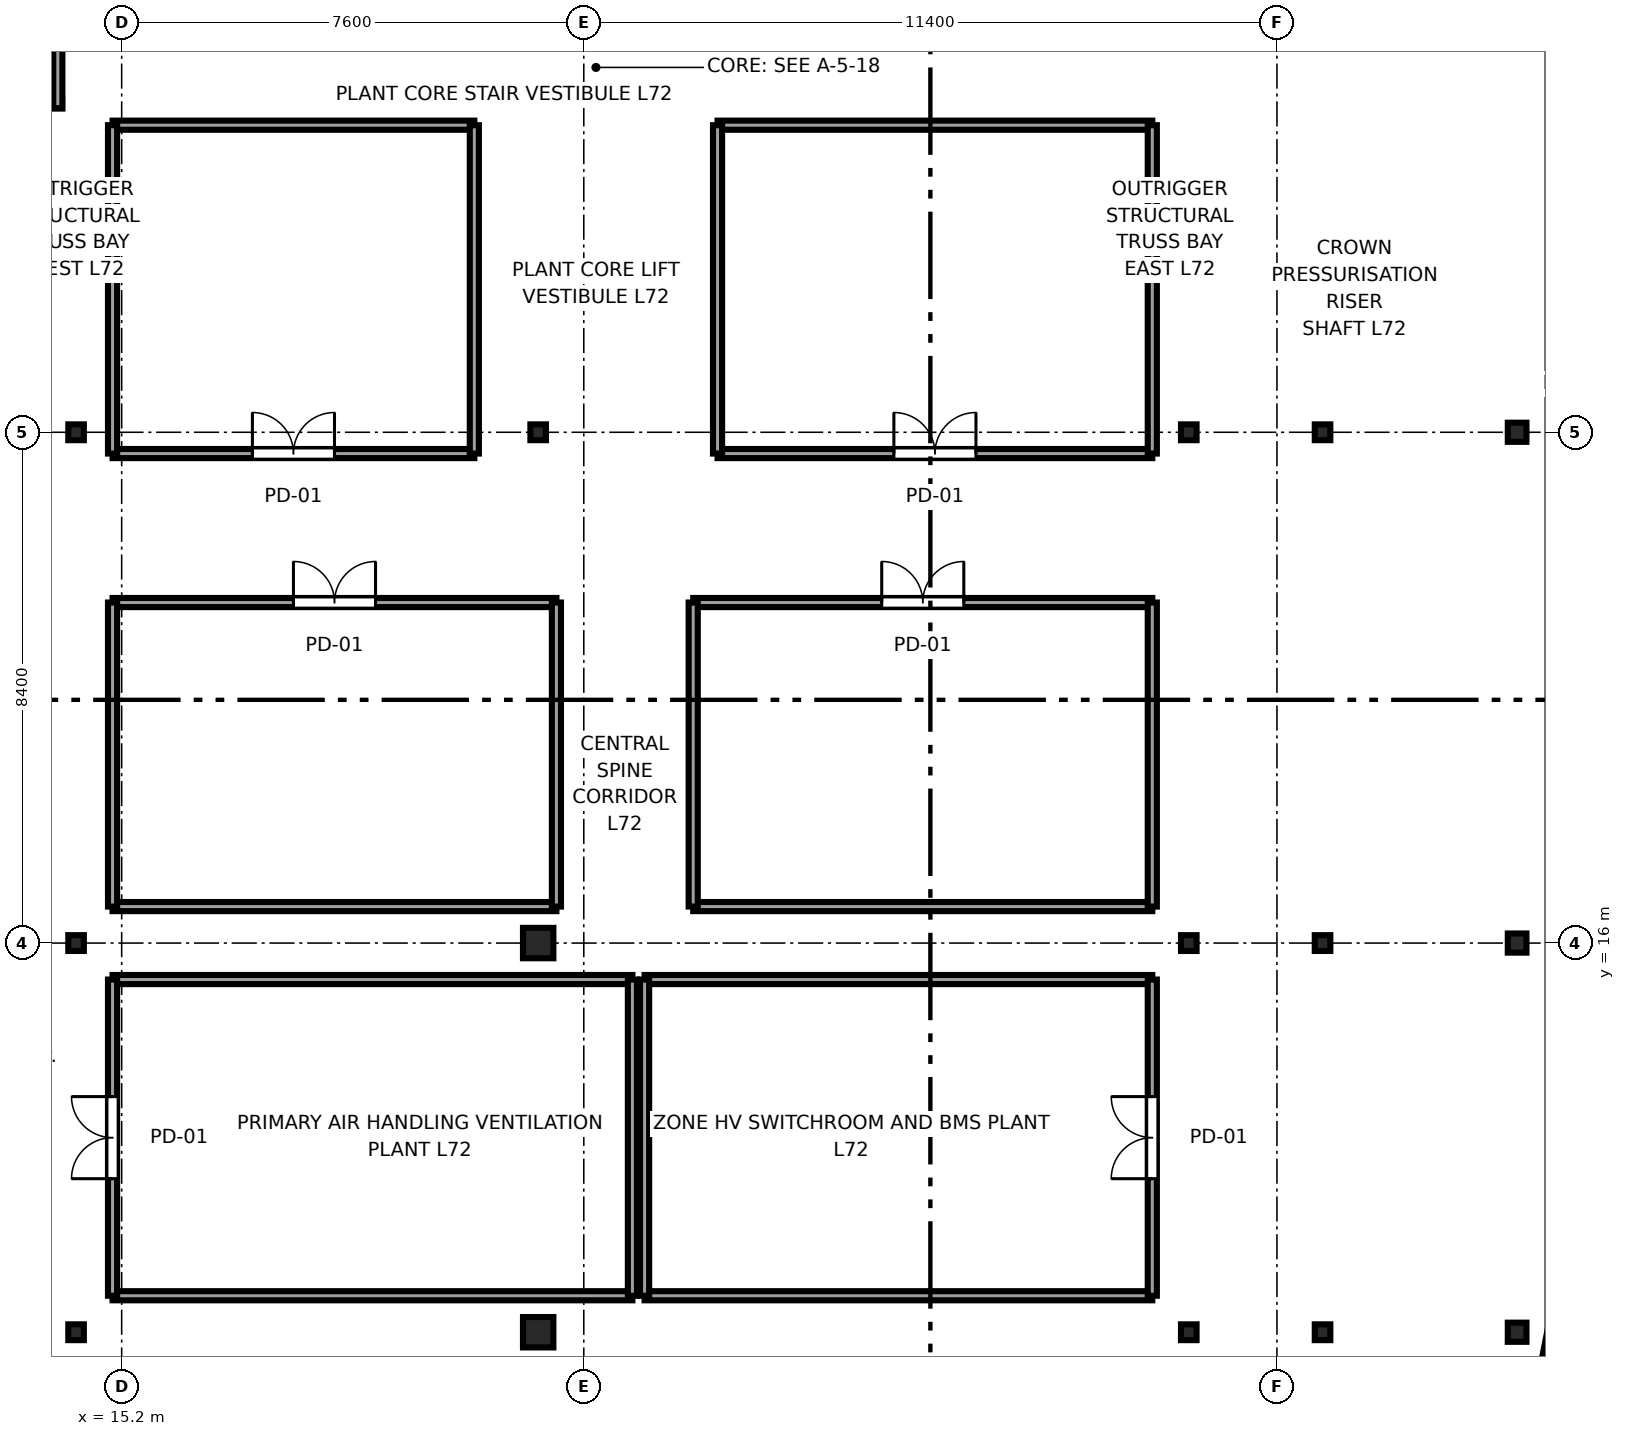
"""IFC4 building model, lengths in metres.
Left out: names, types, materials, properties, quantities, classifications, styles, units other than length and angle.
Written with IfcOpenShell. Run it as: python <this file> out.ifc"""

import sys

from ifc_helpers import new_model, si_unit, direction, frame, frame_2d, origin, origin_2d, place, context, subcontext, project, spatial, rectangle, i_section, extrude, source, transform, mapped, element, fill, save


model = new_model("IFC4")
c1 = context("Model", 3, precision=1e-05, world=origin(), true_north=direction((0.0, 1.0)))
c2 = subcontext(c1, "Body", "Model", "MODEL_VIEW")
j1 = project(units=[si_unit("LENGTHUNIT", "METRE"), si_unit("PLANEANGLEUNIT", "RADIAN")], contexts=[c1])
p1 = place(None, origin())
s1 = spatial("IfcSite", under=j1, at=p1, CompositionType="ELEMENT")
p2 = place(p1, origin())
s2 = spatial("IfcBuilding", under=s1, at=p2, CompositionType="ELEMENT")
p3 = place(p2, frame((0.0, 0.0, 270.05)))
s3 = spatial("IfcBuildingStorey", under=s2, at=p3, CompositionType="ELEMENT", Elevation=270.05)
m1 = source(origin(), c2, "Body", "SweptSolid", [
    extrude(i_section(OverallWidth=0.256, OverallDepth=0.26, WebThickness=0.01, FlangeThickness=0.017, FilletRadius=0.014, at=origin_2d()), origin(), (0.0, 0.0, 1.0), 5.0),
])
for number, where, z_axis, x_axis in (
    (1, (14.45, 9.6, 0.0), (0.0, 0.0, 1.0), (1.0, 0.0, 0.0)),
    (2, (14.45, 16.0, 0.0), (0.0, 0.0, 1.0), (1.0, 0.0, 0.0)),
    (3, (14.45, 24.4, 0.0), (0.0, 0.0, 1.0), (1.0, 0.0, 0.0)),
):
    element("IfcColumn", number, at=place(p3, frame(where, z_axis=z_axis, x_axis=x_axis)), inside=s3, PredefinedType="COLUMN", context=c2, shape_type="MappedRepresentation", body=[
        mapped(m1, transform((0.0, 0.0, 0.0), x_axis=(1.0, 0.0, 0.0), y_axis=(0.0, 1.0, 0.0), z_axis=(0.0, 0.0, 1.0), scale=1.0)),
    ])
m2 = source(origin(), c2, "Body", "SweptSolid", [
    extrude(i_section(OverallWidth=0.5, OverallDepth=0.5, WebThickness=0.028, FlangeThickness=0.045, at=origin_2d()), origin(), (0.0, 0.0, 1.0), 5.0),
])
for number, where, z_axis, x_axis in (
    (4, (22.05, 9.6, 0.0), (0.0, 0.0, 1.0), (1.0, 0.0, 0.0)),
    (5, (22.05, 16.0, 0.0), (0.0, 0.0, 1.0), (1.0, 0.0, 0.0)),
):
    element("IfcColumn", number, at=place(p3, frame(where, z_axis=z_axis, x_axis=x_axis)), inside=s3, PredefinedType="COLUMN", context=c2, shape_type="MappedRepresentation", body=[
        mapped(m2, transform((0.0, 0.0, 0.0), x_axis=(1.0, 0.0, 0.0), y_axis=(0.0, 1.0, 0.0), z_axis=(0.0, 0.0, 1.0), scale=1.0)),
    ])
for number, where, z_axis, x_axis in (
    (6, (22.05, 24.4, 0.0), (0.0, 0.0, 1.0), (1.0, 0.0, 0.0)),
    (7, (32.75, 9.6, 0.0), (0.0, 0.0, 1.0), (1.0, 0.0, 0.0)),
    (8, (32.75, 16.0, 0.0), (0.0, 0.0, 1.0), (1.0, 0.0, 0.0)),
    (9, (32.75, 24.4, 0.0), (0.0, 0.0, 1.0), (1.0, 0.0, 0.0)),
    (10, (34.95, 9.6, 0.0), (0.0, 0.0, 1.0), (1.0, 0.0, 0.0)),
    (11, (34.95, 16.0, 0.0), (0.0, 0.0, 1.0), (1.0, 0.0, 0.0)),
    (12, (34.95, 24.4, 0.0), (0.0, 0.0, 1.0), (1.0, 0.0, 0.0)),
):
    element("IfcColumn", number, at=place(p3, frame(where, z_axis=z_axis, x_axis=x_axis)), inside=s3, PredefinedType="COLUMN", context=c2, shape_type="MappedRepresentation", body=[
        mapped(m1, transform((0.0, 0.0, 0.0), x_axis=(1.0, 0.0, 0.0), y_axis=(0.0, 1.0, 0.0), z_axis=(0.0, 0.0, 1.0), scale=1.0)),
    ])
m3 = source(origin(), c2, "Body", "SweptSolid", [
    extrude(i_section(OverallWidth=0.307, OverallDepth=0.315, WebThickness=0.012, FlangeThickness=0.019, FilletRadius=0.017, at=origin_2d()), origin(), (0.0, 0.0, 1.0), 5.0),
])
for number, where, z_axis, x_axis in (
    (13, (38.15, 9.6, 0.0), (0.0, 0.0, 1.0), (1.0, 0.0, 0.0)),
    (14, (38.15, 16.0, 0.0), (0.0, 0.0, 1.0), (1.0, 0.0, 0.0)),
    (15, (38.15, 24.4, 0.0), (0.0, 0.0, 1.0), (1.0, 0.0, 0.0)),
):
    element("IfcColumn", number, at=place(p3, frame(where, z_axis=z_axis, x_axis=x_axis)), inside=s3, PredefinedType="COLUMN", context=c2, shape_type="MappedRepresentation", body=[
        mapped(m3, transform((0.0, 0.0, 0.0), x_axis=(1.0, 0.0, 0.0), y_axis=(0.0, 1.0, 0.0), z_axis=(0.0, 0.0, 1.0), scale=1.0)),
    ])
p4 = place(p3, frame((38.5, 7.985, 0.0), z_axis=(0.0, 0.0, 1.0), x_axis=(0.195072403631, 0.980788844421, 0.0)))
e16 = element("IfcWall", 16, at=p4, inside=s3, PredefinedType="SOLIDWALL", context=c2, shape_type="SweptSolid", body=[
    extrude(rectangle(XDim=1.665, YDim=0.35, at=frame_2d((0.832, 0.0))), origin(), (0.0, 0.0, 1.0), 3.57),
])
p5 = place(p3, frame((15.05, 24.05, 0.0), z_axis=(0.0, 0.0, 1.0), x_axis=(1.0, 0.0, 0.0)))
e17 = element("IfcWall", 17, at=p5, inside=s3, PredefinedType="PARTITIONING", context=c2, shape_type="SweptSolid", body=[
    extrude(rectangle(XDim=5.95, YDim=0.15, at=frame_2d((2.975, 0.0))), origin(), (0.0, 0.0, 1.0), 4.78),
])
p6 = place(p5, frame((2.3, 0.0, 0.0)))
e18 = element("IfcOpeningElement", 18, at=p6, cuts=e17, PredefinedType="OPENING", context=c2, shape_type="SweptSolid", body=[
    extrude(rectangle(XDim=1.35, YDim=2.15, at=frame_2d((0.675, 1.075))), frame((0.0, 0.085, 0.0), z_axis=(0.0, -1.0, 0.0), x_axis=(1.0, 0.0, 0.0)), (0.0, 0.0, 1.0), 0.17),
])
p7 = place(p3, frame((15.05, 29.45, 0.0), z_axis=(0.0, 0.0, 1.0), x_axis=(1.0, 0.0, 0.0)))
e19 = element("IfcWall", 19, at=p7, inside=s3, PredefinedType="PARTITIONING", context=c2, shape_type="SweptSolid", body=[
    extrude(rectangle(XDim=5.95, YDim=0.15, at=frame_2d((2.975, 0.0))), origin(), (0.0, 0.0, 1.0), 4.78),
])
for number, where, z_axis, x_axis in (
    (20, (15.05, 24.05, 0.0), (0.0, 0.0, 1.0), (0.0, 1.0, 0.0)),
    (21, (21.0, 24.05, 0.0), (0.0, 0.0, 1.0), (0.0, 1.0, 0.0)),
):
    element("IfcWall", number, at=place(p3, frame(where, z_axis=z_axis, x_axis=x_axis)), inside=s3, PredefinedType="PARTITIONING", context=c2, shape_type="SweptSolid", body=[
        extrude(rectangle(XDim=5.4, YDim=0.15, at=frame_2d((2.7, 0.0))), origin(), (0.0, 0.0, 1.0), 4.78),
    ])
p8 = place(p3, frame((25.0, 24.05, 0.0), z_axis=(0.0, 0.0, 1.0), x_axis=(1.0, 0.0, 0.0)))
e22 = element("IfcWall", 22, at=p8, inside=s3, PredefinedType="PARTITIONING", context=c2, shape_type="SweptSolid", body=[
    extrude(rectangle(XDim=7.15, YDim=0.15, at=frame_2d((3.575, 0.0))), origin(), (0.0, 0.0, 1.0), 4.78),
])
p9 = place(p8, frame((2.9, 0.0, 0.0)))
e23 = element("IfcOpeningElement", 23, at=p9, cuts=e22, PredefinedType="OPENING", context=c2, shape_type="SweptSolid", body=[
    extrude(rectangle(XDim=1.35, YDim=2.15, at=frame_2d((0.675, 1.075))), frame((0.0, 0.085, 0.0), z_axis=(0.0, -1.0, 0.0), x_axis=(1.0, 0.0, 0.0)), (0.0, 0.0, 1.0), 0.17),
])
p10 = place(p3, frame((25.0, 29.45, 0.0), z_axis=(0.0, 0.0, 1.0), x_axis=(1.0, 0.0, 0.0)))
e24 = element("IfcWall", 24, at=p10, inside=s3, PredefinedType="PARTITIONING", context=c2, shape_type="SweptSolid", body=[
    extrude(rectangle(XDim=7.15, YDim=0.15, at=frame_2d((3.575, 0.0))), origin(), (0.0, 0.0, 1.0), 4.78),
])
for number, where, z_axis, x_axis in (
    (25, (25.0, 24.05, 0.0), (0.0, 0.0, 1.0), (0.0, 1.0, 0.0)),
    (26, (32.15, 24.05, 0.0), (0.0, 0.0, 1.0), (0.0, 1.0, 0.0)),
):
    element("IfcWall", number, at=place(p3, frame(where, z_axis=z_axis, x_axis=x_axis)), inside=s3, PredefinedType="PARTITIONING", context=c2, shape_type="SweptSolid", body=[
        extrude(rectangle(XDim=5.4, YDim=0.15, at=frame_2d((2.7, 0.0))), origin(), (0.0, 0.0, 1.0), 4.78),
    ])
p11 = place(p3, frame((9.83, 29.8, 0.0), z_axis=(0.0, 0.0, 1.0), x_axis=(1.0, 0.0, 0.0)))
e27 = element("IfcWall", 27, at=p11, inside=s3, PredefinedType="PARTITIONING", context=c2, shape_type="SweptSolid", body=[
    extrude(rectangle(XDim=4.39, YDim=0.15, at=frame_2d((2.195, 0.0))), origin(), (0.0, 0.0, 1.0), 4.78),
])
p12 = place(p3, frame((14.15, 29.73, 0.0), z_axis=(0.0, 0.0, 1.0), x_axis=(0.0, 1.0, 0.0)))
e28 = element("IfcWall", 28, at=p12, inside=s3, PredefinedType="PARTITIONING", context=c2, shape_type="SweptSolid", body=[
    extrude(rectangle(XDim=1.815, YDim=0.15, at=frame_2d((0.907, 0.0))), origin(), (0.0, 0.0, 1.0), 3.57),
])
for number, where, z_axis, x_axis in (
    (29, (15.05, 10.2, 0.0), (0.0, 0.0, 1.0), (1.0, 0.0, 0.0)),
    (30, (15.05, 15.4, 0.0), (0.0, 0.0, 1.0), (1.0, 0.0, 0.0)),
):
    element("IfcWall", number, at=place(p3, frame(where, z_axis=z_axis, x_axis=x_axis)), inside=s3, PredefinedType="PARTITIONING", context=c2, shape_type="SweptSolid", body=[
        extrude(rectangle(XDim=8.55, YDim=0.15, at=frame_2d((4.275, 0.0))), origin(), (0.0, 0.0, 1.0), 4.78),
    ])
p13 = place(p3, frame((15.05, 10.2, 0.0), z_axis=(0.0, 0.0, 1.0), x_axis=(0.0, 1.0, 0.0)))
e31 = element("IfcWall", 31, at=p13, inside=s3, PredefinedType="PARTITIONING", context=c2, shape_type="SweptSolid", body=[
    extrude(rectangle(XDim=5.2, YDim=0.15, at=frame_2d((2.6, 0.0))), origin(), (0.0, 0.0, 1.0), 4.78),
])
p14 = place(p13, frame((1.925, 0.0, 0.0)))
e32 = element("IfcOpeningElement", 32, at=p14, cuts=e31, PredefinedType="OPENING", context=c2, shape_type="SweptSolid", body=[
    extrude(rectangle(XDim=1.35, YDim=2.15, at=frame_2d((0.675, 1.075))), frame((0.0, 0.085, 0.0), z_axis=(0.0, -1.0, 0.0), x_axis=(1.0, 0.0, 0.0)), (0.0, 0.0, 1.0), 0.17),
])
p15 = place(p3, frame((23.6, 10.2, 0.0), z_axis=(0.0, 0.0, 1.0), x_axis=(0.0, 1.0, 0.0)))
e33 = element("IfcWall", 33, at=p15, inside=s3, PredefinedType="PARTITIONING", context=c2, shape_type="SweptSolid", body=[
    extrude(rectangle(XDim=5.2, YDim=0.15, at=frame_2d((2.6, 0.0))), origin(), (0.0, 0.0, 1.0), 4.78),
])
for number, where, z_axis, x_axis in (
    (34, (23.8, 10.2, 0.0), (0.0, 0.0, 1.0), (1.0, 0.0, 0.0)),
    (35, (23.8, 15.4, 0.0), (0.0, 0.0, 1.0), (1.0, 0.0, 0.0)),
):
    element("IfcWall", number, at=place(p3, frame(where, z_axis=z_axis, x_axis=x_axis)), inside=s3, PredefinedType="PARTITIONING", context=c2, shape_type="SweptSolid", body=[
        extrude(rectangle(XDim=8.35, YDim=0.15, at=frame_2d((4.175, 0.0))), origin(), (0.0, 0.0, 1.0), 4.78),
    ])
p16 = place(p3, frame((23.8, 10.2, 0.0), z_axis=(0.0, 0.0, 1.0), x_axis=(0.0, 1.0, 0.0)))
e36 = element("IfcWall", 36, at=p16, inside=s3, PredefinedType="PARTITIONING", context=c2, shape_type="SweptSolid", body=[
    extrude(rectangle(XDim=5.2, YDim=0.15, at=frame_2d((2.6, 0.0))), origin(), (0.0, 0.0, 1.0), 4.78),
])
p17 = place(p3, frame((32.15, 10.2, 0.0), z_axis=(0.0, 0.0, 1.0), x_axis=(0.0, 1.0, 0.0)))
e37 = element("IfcWall", 37, at=p17, inside=s3, PredefinedType="PARTITIONING", context=c2, shape_type="SweptSolid", body=[
    extrude(rectangle(XDim=5.2, YDim=0.15, at=frame_2d((2.6, 0.0))), origin(), (0.0, 0.0, 1.0), 4.78),
])
p18 = place(p17, frame((1.925, 0.0, 0.0)))
e38 = element("IfcOpeningElement", 38, at=p18, cuts=e37, PredefinedType="OPENING", context=c2, shape_type="SweptSolid", body=[
    extrude(rectangle(XDim=1.35, YDim=2.15, at=frame_2d((0.675, 1.075))), frame((0.0, 0.085, 0.0), z_axis=(0.0, -1.0, 0.0), x_axis=(1.0, 0.0, 0.0)), (0.0, 0.0, 1.0), 0.17),
])
p19 = place(p3, frame((15.05, 16.6, 0.0), z_axis=(0.0, 0.0, 1.0), x_axis=(1.0, 0.0, 0.0)))
e39 = element("IfcWall", 39, at=p19, inside=s3, PredefinedType="PARTITIONING", context=c2, shape_type="SweptSolid", body=[
    extrude(rectangle(XDim=7.3, YDim=0.15, at=frame_2d((3.65, 0.0))), origin(), (0.0, 0.0, 1.0), 4.78),
])
p20 = place(p3, frame((15.05, 21.6, 0.0), z_axis=(0.0, 0.0, 1.0), x_axis=(1.0, 0.0, 0.0)))
e40 = element("IfcWall", 40, at=p20, inside=s3, PredefinedType="PARTITIONING", context=c2, shape_type="SweptSolid", body=[
    extrude(rectangle(XDim=7.3, YDim=0.15, at=frame_2d((3.65, 0.0))), origin(), (0.0, 0.0, 1.0), 4.78),
])
p21 = place(p20, frame((2.975, 0.0, 0.0)))
e41 = element("IfcOpeningElement", 41, at=p21, cuts=e40, PredefinedType="OPENING", context=c2, shape_type="SweptSolid", body=[
    extrude(rectangle(XDim=1.35, YDim=2.15, at=frame_2d((0.675, 1.075))), frame((0.0, 0.085, 0.0), z_axis=(0.0, -1.0, 0.0), x_axis=(1.0, 0.0, 0.0)), (0.0, 0.0, 1.0), 0.17),
])
p22 = place(p3, frame((15.05, 16.6, 0.0), z_axis=(0.0, 0.0, 1.0), x_axis=(0.0, 1.0, 0.0)))
e42 = element("IfcWall", 42, at=p22, inside=s3, PredefinedType="PARTITIONING", context=c2, shape_type="SweptSolid", body=[
    extrude(rectangle(XDim=5.0, YDim=0.15, at=frame_2d((2.5, 0.0))), origin(), (0.0, 0.0, 1.0), 4.78),
])
p23 = place(p3, frame((22.35, 16.6, 0.0), z_axis=(0.0, 0.0, 1.0), x_axis=(0.0, 1.0, 0.0)))
e43 = element("IfcWall", 43, at=p23, inside=s3, PredefinedType="PARTITIONING", context=c2, shape_type="SweptSolid", body=[
    extrude(rectangle(XDim=5.0, YDim=0.15, at=frame_2d((2.5, 0.0))), origin(), (0.0, 0.0, 1.0), 3.57),
])
p24 = place(p3, frame((24.6, 16.6, 0.0), z_axis=(0.0, 0.0, 1.0), x_axis=(1.0, 0.0, 0.0)))
e44 = element("IfcWall", 44, at=p24, inside=s3, PredefinedType="PARTITIONING", context=c2, shape_type="SweptSolid", body=[
    extrude(rectangle(XDim=7.55, YDim=0.15, at=frame_2d((3.775, 0.0))), origin(), (0.0, 0.0, 1.0), 4.78),
])
p25 = place(p3, frame((24.6, 21.6, 0.0), z_axis=(0.0, 0.0, 1.0), x_axis=(1.0, 0.0, 0.0)))
e45 = element("IfcWall", 45, at=p25, inside=s3, PredefinedType="PARTITIONING", context=c2, shape_type="SweptSolid", body=[
    extrude(rectangle(XDim=7.55, YDim=0.15, at=frame_2d((3.775, 0.0))), origin(), (0.0, 0.0, 1.0), 4.78),
])
p26 = place(p25, frame((3.1, 0.0, 0.0)))
e46 = element("IfcOpeningElement", 46, at=p26, cuts=e45, PredefinedType="OPENING", context=c2, shape_type="SweptSolid", body=[
    extrude(rectangle(XDim=1.35, YDim=2.15, at=frame_2d((0.675, 1.075))), frame((0.0, 0.085, 0.0), z_axis=(0.0, -1.0, 0.0), x_axis=(1.0, 0.0, 0.0)), (0.0, 0.0, 1.0), 0.17),
])
for number, where, z_axis, x_axis in (
    (47, (24.6, 16.6, 0.0), (0.0, 0.0, 1.0), (0.0, 1.0, 0.0)),
    (48, (32.15, 16.6, 0.0), (0.0, 0.0, 1.0), (0.0, 1.0, 0.0)),
):
    element("IfcWall", number, at=place(p3, frame(where, z_axis=z_axis, x_axis=x_axis)), inside=s3, PredefinedType="PARTITIONING", context=c2, shape_type="SweptSolid", body=[
        extrude(rectangle(XDim=5.0, YDim=0.15, at=frame_2d((2.5, 0.0))), origin(), (0.0, 0.0, 1.0), 4.78),
    ])
m4 = source(origin(), c2, "Body", "SweptSolid", [
    extrude(rectangle(XDim=1.35, YDim=2.15, at=frame_2d((0.675, 1.075))), frame((0.0, 0.025, 0.0), z_axis=(0.0, -1.0, 0.0), x_axis=(1.0, 0.0, 0.0)), (0.0, 0.0, 1.0), 0.05),
])
p27 = place(p6, origin())
e49 = element("IfcDoor", 49, at=p27, inside=s3, OperationType="DOUBLE_DOOR_SINGLE_SWING", PredefinedType="DOOR", context=c2, shape_type="MappedRepresentation", body=[
    mapped(m4, transform((0.0, 0.0, 0.0), x_axis=(1.0, 0.0, 0.0), y_axis=(0.0, 1.0, 0.0), z_axis=(0.0, 0.0, 1.0), scale=1.0)),
])
fill(e18, e49)
p28 = place(p9, origin())
e50 = element("IfcDoor", 50, at=p28, inside=s3, OperationType="DOUBLE_DOOR_SINGLE_SWING", PredefinedType="DOOR", context=c2, shape_type="MappedRepresentation", body=[
    mapped(m4, transform((0.0, 0.0, 0.0), x_axis=(1.0, 0.0, 0.0), y_axis=(0.0, 1.0, 0.0), z_axis=(0.0, 0.0, 1.0), scale=1.0)),
])
fill(e23, e50)
p29 = place(p14, origin())
e51 = element("IfcDoor", 51, at=p29, inside=s3, OperationType="DOUBLE_DOOR_SINGLE_SWING", PredefinedType="DOOR", context=c2, shape_type="MappedRepresentation", body=[
    mapped(m4, transform((0.0, 0.0, 0.0), x_axis=(1.0, 0.0, 0.0), y_axis=(0.0, 1.0, 0.0), z_axis=(0.0, 0.0, 1.0), scale=1.0)),
])
fill(e32, e51)
p30 = place(p18, origin())
e52 = element("IfcDoor", 52, at=p30, inside=s3, OperationType="DOUBLE_DOOR_SINGLE_SWING", PredefinedType="DOOR", context=c2, shape_type="MappedRepresentation", body=[
    mapped(m4, transform((0.0, 0.0, 0.0), x_axis=(1.0, 0.0, 0.0), y_axis=(0.0, 1.0, 0.0), z_axis=(0.0, 0.0, 1.0), scale=1.0)),
])
fill(e38, e52)
p31 = place(p21, origin())
e53 = element("IfcDoor", 53, at=p31, inside=s3, OperationType="DOUBLE_DOOR_SINGLE_SWING", PredefinedType="DOOR", context=c2, shape_type="MappedRepresentation", body=[
    mapped(m4, transform((0.0, 0.0, 0.0), x_axis=(1.0, 0.0, 0.0), y_axis=(0.0, 1.0, 0.0), z_axis=(0.0, 0.0, 1.0), scale=1.0)),
])
fill(e41, e53)
p32 = place(p26, origin())
e54 = element("IfcDoor", 54, at=p32, inside=s3, OperationType="DOUBLE_DOOR_SINGLE_SWING", PredefinedType="DOOR", context=c2, shape_type="MappedRepresentation", body=[
    mapped(m4, transform((0.0, 0.0, 0.0), x_axis=(1.0, 0.0, 0.0), y_axis=(0.0, 1.0, 0.0), z_axis=(0.0, 0.0, 1.0), scale=1.0)),
])
fill(e46, e54)
save(model, sys.argv[1])
